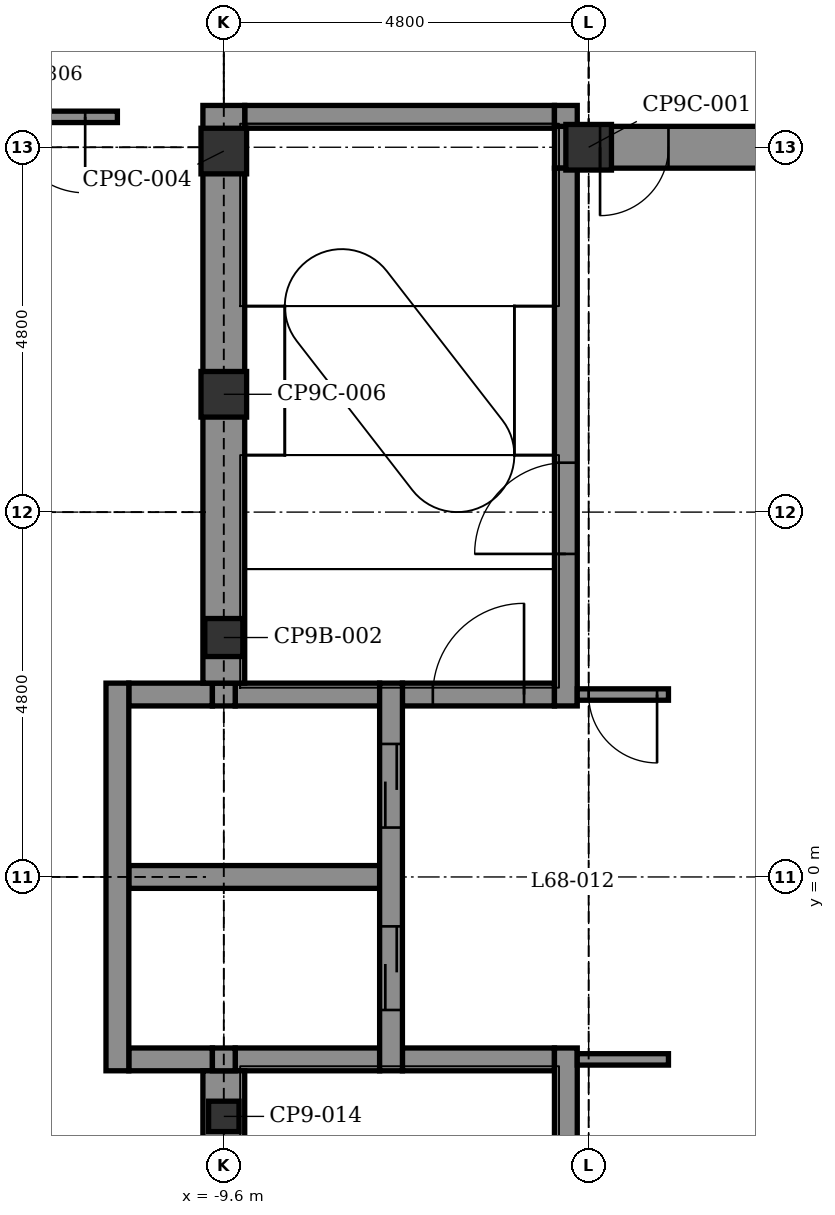
"""IFC4 building model, lengths in metres.
Left out: names, types, materials, properties, quantities, classifications, styles, units other than length and angle.
Written with IfcOpenShell. Run it as: python <this file> out.ifc"""

import sys

from ifc_helpers import new_model, si_unit, direction, frame, frame_2d, origin, origin_2d, place, context, subcontext, project, spatial, polyline, rectangle, hollow_rectangle, outline, extrude, element, fill, save


model = new_model("IFC4")
c1 = context("Model", 3, precision=1e-05, world=origin(), true_north=direction((0.0, 1.0)))
c2 = subcontext(c1, "Body", "Model", "MODEL_VIEW")
j1 = project(units=[si_unit("LENGTHUNIT", "METRE"), si_unit("PLANEANGLEUNIT", "RADIAN")], contexts=[c1])
p1 = place(None, origin())
s1 = spatial("IfcSite", under=j1, at=p1, CompositionType="ELEMENT")
p2 = place(p1, origin())
s2 = spatial("IfcBuilding", under=s1, at=p2, CompositionType="ELEMENT")
p3 = place(p2, frame((0.0, 0.0, 301.9)))
s3 = spatial("IfcBuildingStorey", under=s2, at=p3, CompositionType="ELEMENT", Elevation=301.9)
p4 = place(p3, frame((-10.85, -2.4, -0.3), z_axis=(0.0, 0.0, 1.0), x_axis=(1.0, 0.0, 0.0)))
e1 = element("IfcWall", 1, at=p4, inside=s3, PredefinedType="STANDARD", context=c2, shape_type="SweptSolid", body=[
    extrude(rectangle(XDim=1.1, YDim=0.3, at=frame_2d((0.55, 0.0))), origin(), (0.0, 0.0, 1.0), 4.7),
])
p5 = place(p3, frame((-9.45, -2.4, -0.3), z_axis=(0.0, 0.0, 1.0), x_axis=(1.0, 0.0, 0.0)))
e2 = element("IfcWall", 2, at=p5, inside=s3, PredefinedType="STANDARD", context=c2, shape_type="SweptSolid", body=[
    extrude(rectangle(XDim=1.9, YDim=0.3, at=frame_2d((0.95, 0.0))), origin(), (0.0, 0.0, 1.0), 5.3),
])
p6 = place(p3, frame((-7.25, -2.4, -0.3), z_axis=(0.0, 0.0, 1.0), x_axis=(1.0, 0.0, 0.0)))
e3 = element("IfcWall", 3, at=p6, inside=s3, PredefinedType="STANDARD", context=c2, shape_type="SweptSolid", body=[
    extrude(rectangle(XDim=2.0, YDim=0.3, at=frame_2d((1.0, 0.0))), origin(), (0.0, 0.0, 1.0), 5.3),
])
p7 = place(p3, frame((-10.85, 0.0, -0.3), z_axis=(0.0, 0.0, 1.0), x_axis=(1.0, 0.0, 0.0)))
e4 = element("IfcWall", 4, at=p7, inside=s3, PredefinedType="STANDARD", context=c2, shape_type="SweptSolid", body=[
    extrude(rectangle(XDim=3.3, YDim=0.3, at=frame_2d((1.65, 0.0))), origin(), (0.0, 0.0, 1.0), 4.7),
])
p8 = place(p3, frame((-10.85, 2.4, -0.3), z_axis=(0.0, 0.0, 1.0), x_axis=(1.0, 0.0, 0.0)))
e5 = element("IfcWall", 5, at=p8, inside=s3, PredefinedType="STANDARD", context=c2, shape_type="SweptSolid", body=[
    extrude(rectangle(XDim=1.1, YDim=0.3, at=frame_2d((0.55, 0.0))), origin(), (0.0, 0.0, 1.0), 4.7),
])
p9 = place(p3, frame((-9.45, 2.4, -0.3), z_axis=(0.0, 0.0, 1.0), x_axis=(1.0, 0.0, 0.0)))
e6 = element("IfcWall", 6, at=p9, inside=s3, PredefinedType="STANDARD", context=c2, shape_type="SweptSolid", body=[
    extrude(rectangle(XDim=1.9, YDim=0.3, at=frame_2d((0.95, 0.0))), origin(), (0.0, 0.0, 1.0), 5.3),
])
p10 = place(p3, frame((-7.25, 2.4, -0.3), z_axis=(0.0, 0.0, 1.0), x_axis=(1.0, 0.0, 0.0)))
e7 = element("IfcWall", 7, at=p10, inside=s3, PredefinedType="STANDARD", context=c2, shape_type="SweptSolid", body=[
    extrude(rectangle(XDim=2.0, YDim=0.3, at=frame_2d((1.0, 0.0))), origin(), (0.0, 0.0, 1.0), 5.3),
])
p11 = place(p10, frame((0.4, 0.0, 0.3)))
e8 = element("IfcOpeningElement", 8, at=p11, cuts=e7, PredefinedType="OPENING", context=c2, shape_type="SweptSolid", body=[
    extrude(rectangle(XDim=1.2, YDim=2.1, at=frame_2d((0.6, 1.05))), frame((0.0, 0.16, 0.0), z_axis=(0.0, -1.0, 0.0), x_axis=(1.0, 0.0, 0.0)), (0.0, 0.0, 1.0), 0.32),
])
p12 = place(p3, frame((-5.25, 9.6, -0.3), z_axis=(0.0, 0.0, 1.0), x_axis=(1.0, 0.0, 0.0)))
e9 = element("IfcWall", 9, at=p12, inside=s3, PredefinedType="SHEAR", context=c2, shape_type="SweptSolid", body=[
    extrude(rectangle(XDim=14.575, YDim=0.55, at=frame_2d((7.288, 0.0))), origin(), (0.0, 0.0, 1.0), 5.3),
])
p13 = place(p12, frame((0.6, 0.0, 0.3)))
e10 = element("IfcOpeningElement", 10, at=p13, cuts=e9, PredefinedType="OPENING", context=c2, shape_type="SweptSolid", body=[
    extrude(rectangle(XDim=0.9, YDim=2.1, at=frame_2d((0.45, 1.05))), frame((0.0, 0.285, 0.0), z_axis=(0.0, -1.0, 0.0), x_axis=(1.0, 0.0, 0.0)), (0.0, 0.0, 1.0), 0.57),
])
p14 = place(p3, frame((-9.325, 10.0, -0.3), z_axis=(0.0, 0.0, 1.0), x_axis=(1.0, 0.0, 0.0)))
e11 = element("IfcWall", 11, at=p14, inside=s3, PredefinedType="STANDARD", context=c2, shape_type="SweptSolid", body=[
    extrude(rectangle(XDim=4.075, YDim=0.3, at=frame_2d((2.038, 0.0))), origin(), (0.0, 0.0, 1.0), 5.3),
])
p15 = place(p3, frame((-11.0, -2.55, -0.3), z_axis=(0.0, 0.0, 1.0), x_axis=(0.0, 1.0, 0.0)))
e12 = element("IfcWall", 12, at=p15, inside=s3, PredefinedType="STANDARD", context=c2, shape_type="SweptSolid", body=[
    extrude(rectangle(XDim=5.1, YDim=0.3, at=frame_2d((2.55, 0.0))), origin(), (0.0, 0.0, 1.0), 4.7),
])
p16 = place(p3, frame((-9.6, -10.15, -0.3), z_axis=(0.0, 0.0, 1.0), x_axis=(0.0, 1.0, 0.0)))
e13 = element("IfcWall", 13, at=p16, inside=s3, PredefinedType="SHEAR", context=c2, shape_type="SweptSolid", body=[
    extrude(rectangle(XDim=7.6, YDim=0.55, at=frame_2d((3.8, 0.0))), origin(), (0.0, 0.0, 1.0), 5.3),
])
for number, where, z_axis, x_axis in (
    (14, (-9.6, -2.55, -0.3), (0.0, 0.0, 1.0), (0.0, 1.0, 0.0)),
    (15, (-9.6, 2.25, -0.3), (0.0, 0.0, 1.0), (0.0, 1.0, 0.0)),
):
    element("IfcWall", number, at=place(p3, frame(where, z_axis=z_axis, x_axis=x_axis)), inside=s3, PredefinedType="STANDARD", context=c2, shape_type="SweptSolid", body=[
        extrude(rectangle(XDim=0.3, YDim=0.3, at=frame_2d((0.15, 0.0))), origin(), (0.0, 0.0, 1.0), 5.3),
    ])
p17 = place(p3, frame((-9.6, 2.55, -0.3), z_axis=(0.0, 0.0, 1.0), x_axis=(0.0, 1.0, 0.0)))
e16 = element("IfcWall", 16, at=p17, inside=s3, PredefinedType="SHEAR", context=c2, shape_type="SweptSolid", body=[
    extrude(rectangle(XDim=7.6, YDim=0.55, at=frame_2d((3.8, 0.0))), origin(), (0.0, 0.0, 1.0), 5.3),
])
p18 = place(p3, frame((-7.4, -2.55, -0.3), z_axis=(0.0, 0.0, 1.0), x_axis=(0.0, 1.0, 0.0)))
e17 = element("IfcWall", 17, at=p18, inside=s3, PredefinedType="STANDARD", context=c2, shape_type="SweptSolid", body=[
    extrude(rectangle(XDim=5.1, YDim=0.3, at=frame_2d((2.55, 0.0))), origin(), (0.0, 0.0, 1.0), 4.7),
])
p19 = place(p18, frame((0.8, 0.0, 0.3)))
e18 = element("IfcOpeningElement", 18, at=p19, cuts=e17, PredefinedType="OPENING", context=c2, shape_type="SweptSolid", body=[
    extrude(rectangle(XDim=1.1, YDim=2.1, at=frame_2d((0.55, 1.05))), frame((0.0, 0.16, 0.0), z_axis=(0.0, -1.0, 0.0), x_axis=(1.0, 0.0, 0.0)), (0.0, 0.0, 1.0), 0.32),
])
p20 = place(p18, frame((3.2, 0.0, 0.3)))
e19 = element("IfcOpeningElement", 19, at=p20, cuts=e17, PredefinedType="OPENING", context=c2, shape_type="SweptSolid", body=[
    extrude(rectangle(XDim=1.1, YDim=2.1, at=frame_2d((0.55, 1.05))), frame((0.0, 0.16, 0.0), z_axis=(0.0, -1.0, 0.0), x_axis=(1.0, 0.0, 0.0)), (0.0, 0.0, 1.0), 0.32),
])
p21 = place(p3, frame((-5.1, -9.325, -0.3), z_axis=(0.0, 0.0, 1.0), x_axis=(0.0, 1.0, 0.0)))
e20 = element("IfcWall", 20, at=p21, inside=s3, PredefinedType="STANDARD", context=c2, shape_type="SweptSolid", body=[
    extrude(rectangle(XDim=7.075, YDim=0.3, at=frame_2d((3.538, 0.0))), origin(), (0.0, 0.0, 1.0), 5.3),
])
p22 = place(p21, frame((3.875, 0.0, 0.3)))
e21 = element("IfcOpeningElement", 21, at=p22, cuts=e20, PredefinedType="OPENING", context=c2, shape_type="SweptSolid", body=[
    extrude(rectangle(XDim=1.2, YDim=2.1, at=frame_2d((0.6, 1.05))), frame((0.0, 0.16, 0.0), z_axis=(0.0, -1.0, 0.0), x_axis=(1.0, 0.0, 0.0)), (0.0, 0.0, 1.0), 0.32),
])
p23 = place(p3, frame((-5.1, 2.25, -0.3), z_axis=(0.0, 0.0, 1.0), x_axis=(0.0, 1.0, 0.0)))
e22 = element("IfcWall", 22, at=p23, inside=s3, PredefinedType="STANDARD", context=c2, shape_type="SweptSolid", body=[
    extrude(rectangle(XDim=7.075, YDim=0.3, at=frame_2d((3.538, 0.0))), origin(), (0.0, 0.0, 1.0), 5.3),
])
p24 = place(p23, frame((2.0, 0.0, 0.3)))
e23 = element("IfcOpeningElement", 23, at=p24, cuts=e22, PredefinedType="OPENING", context=c2, shape_type="SweptSolid", body=[
    extrude(rectangle(XDim=1.2, YDim=2.1, at=frame_2d((0.6, 1.05))), frame((0.0, 0.16, 0.0), z_axis=(0.0, -1.0, 0.0), x_axis=(1.0, 0.0, 0.0)), (0.0, 0.0, 1.0), 0.32),
])
p25 = place(p3, frame((-5.1, 9.875, -0.3), z_axis=(0.0, 0.0, 1.0), x_axis=(0.0, 1.0, 0.0)))
e24 = element("IfcWall", 24, at=p25, inside=s3, PredefinedType="STANDARD", context=c2, shape_type="SweptSolid", body=[
    extrude(rectangle(XDim=0.275, YDim=0.3, at=frame_2d((0.137, 0.0))), origin(), (0.0, 0.0, 1.0), 5.3),
])
p26 = place(p3, frame((-9.6, -3.15, 5.0), z_axis=(0.0, 0.0, 1.0), x_axis=(1.0, 0.0, 0.0)))
e25 = element("IfcColumn", 25, at=p26, inside=s3, PredefinedType="COLUMN", context=c2, shape_type="SweptSolid", body=[
    extrude(hollow_rectangle(XDim=0.4, YDim=0.4, WallThickness=0.02, at=origin_2d()), origin(), (0.0, 0.0, 1.0), 7.773),
])
p27 = place(p3, frame((-9.6, 3.15, 5.0), z_axis=(0.0, 0.0, 1.0), x_axis=(1.0, 0.0, 0.0)))
e26 = element("IfcColumn", 26, at=p27, inside=s3, PredefinedType="COLUMN", context=c2, shape_type="SweptSolid", body=[
    extrude(hollow_rectangle(XDim=0.5, YDim=0.5, WallThickness=0.025, at=origin_2d()), origin(), (0.0, 0.0, 1.0), 11.71),
])
p28 = place(p3, frame((-9.6, 6.35, 5.0), z_axis=(0.0, 0.0, 1.0), x_axis=(1.0, 0.0, 0.0)))
e27 = element("IfcColumn", 27, at=p28, inside=s3, PredefinedType="COLUMN", context=c2, shape_type="SweptSolid", body=[
    extrude(hollow_rectangle(XDim=0.6, YDim=0.6, WallThickness=0.032, at=origin_2d()), origin(), (0.0, 0.0, 1.0), 13.71),
])
p29 = place(p3, frame((-9.6, 9.55, 5.0), z_axis=(0.0, 0.0, 1.0), x_axis=(1.0, 0.0, 0.0)))
e28 = element("IfcColumn", 28, at=p29, inside=s3, PredefinedType="COLUMN", context=c2, shape_type="SweptSolid", body=[
    extrude(hollow_rectangle(XDim=0.6, YDim=0.6, WallThickness=0.032, at=origin_2d()), origin(), (0.0, 0.0, 1.0), 15.709),
])
p30 = place(p3, frame((-4.8, 9.6, 5.0), z_axis=(0.0, 0.0, 1.0), x_axis=(1.0, 0.0, 0.0)))
e29 = element("IfcColumn", 29, at=p30, inside=s3, PredefinedType="COLUMN", context=c2, shape_type="SweptSolid", body=[
    extrude(hollow_rectangle(XDim=0.6, YDim=0.6, WallThickness=0.032, at=origin_2d()), origin(), (0.0, 0.0, 1.0), 14.915),
])
p31 = place(p3, frame((-10.358, -15.065, 0.0), z_axis=(0.0, 0.0, 1.0), x_axis=(-0.500010301671, 0.86601945603, 0.0)))
e30 = element("IfcWall", 30, at=p31, inside=s3, PredefinedType="SOLIDWALL", context=c2, shape_type="SweptSolid", body=[
    extrude(outline(polyline([(0.0, 0.0), (15.736, 0.0), (15.736, 14.197), (0.0, 5.682), (0.0, 0.0)])), frame((0.0, 0.125, 0.0), z_axis=(0.0, -1.0, 0.0), x_axis=(1.0, 0.0, 0.0)), (0.0, 0.0, 1.0), 0.25),
])
p32 = place(p31, frame((9.068, 0.0, 5.8)))
e31 = element("IfcOpeningElement", 31, at=p32, cuts=e30, PredefinedType="OPENING", context=c2, shape_type="SweptSolid", body=[
    extrude(rectangle(XDim=2.4, YDim=3.6, at=frame_2d((1.2, 1.8))), frame((0.0, 0.135, 0.0), z_axis=(0.0, -1.0, 0.0), x_axis=(1.0, 0.0, 0.0)), (0.0, 0.0, 1.0), 0.27),
])
p33 = place(p31, frame((9.068, 0.0, 1.0)))
e32 = element("IfcOpeningElement", 32, at=p33, cuts=e30, PredefinedType="OPENING", context=c2, shape_type="SweptSolid", body=[
    extrude(rectangle(XDim=2.4, YDim=3.0, at=frame_2d((1.2, 1.5))), frame((0.0, 0.135, 0.0), z_axis=(0.0, -1.0, 0.0), x_axis=(1.0, 0.0, 0.0)), (0.0, 0.0, 1.0), 0.27),
])
p34 = place(p3, frame((-18.226, 1.438, 0.0), z_axis=(0.0, 0.0, 1.0), x_axis=(0.500010301671, 0.86601945603, 0.0)))
e33 = element("IfcWall", 33, at=p34, inside=s3, PredefinedType="SOLIDWALL", context=c2, shape_type="SweptSolid", body=[
    extrude(outline(polyline([(0.0, 0.0), (15.736, 0.0), (15.736, 24.509), (0.0, 15.994), (0.0, 0.0)])), frame((0.0, 0.125, 0.0), z_axis=(0.0, -1.0, 0.0), x_axis=(1.0, 0.0, 0.0)), (0.0, 0.0, 1.0), 0.25),
])
p35 = place(p34, frame((4.268, 0.0, 5.8)))
e34 = element("IfcOpeningElement", 34, at=p35, cuts=e33, PredefinedType="OPENING", context=c2, shape_type="SweptSolid", body=[
    extrude(rectangle(XDim=2.4, YDim=3.6, at=frame_2d((1.2, 1.8))), frame((0.0, 0.135, 0.0), z_axis=(0.0, -1.0, 0.0), x_axis=(1.0, 0.0, 0.0)), (0.0, 0.0, 1.0), 0.27),
])
p36 = place(p34, frame((4.268, 0.0, 10.0)))
e35 = element("IfcOpeningElement", 35, at=p36, cuts=e33, PredefinedType="OPENING", context=c2, shape_type="SweptSolid", body=[
    extrude(rectangle(XDim=2.4, YDim=3.6, at=frame_2d((1.2, 1.8))), frame((0.0, 0.135, 0.0), z_axis=(0.0, -1.0, 0.0), x_axis=(1.0, 0.0, 0.0)), (0.0, 0.0, 1.0), 0.27),
])
p37 = place(p34, frame((9.068, 0.0, 5.8)))
e36 = element("IfcOpeningElement", 36, at=p37, cuts=e33, PredefinedType="OPENING", context=c2, shape_type="SweptSolid", body=[
    extrude(rectangle(XDim=2.4, YDim=3.6, at=frame_2d((1.2, 1.8))), frame((0.0, 0.135, 0.0), z_axis=(0.0, -1.0, 0.0), x_axis=(1.0, 0.0, 0.0)), (0.0, 0.0, 1.0), 0.27),
])
p38 = place(p34, frame((9.068, 0.0, 10.0)))
e37 = element("IfcOpeningElement", 37, at=p38, cuts=e33, PredefinedType="OPENING", context=c2, shape_type="SweptSolid", body=[
    extrude(rectangle(XDim=2.4, YDim=3.6, at=frame_2d((1.2, 1.8))), frame((0.0, 0.135, 0.0), z_axis=(0.0, -1.0, 0.0), x_axis=(1.0, 0.0, 0.0)), (0.0, 0.0, 1.0), 0.27),
])
p39 = place(p34, frame((9.068, 0.0, 14.2)))
e38 = element("IfcOpeningElement", 38, at=p39, cuts=e33, PredefinedType="OPENING", context=c2, shape_type="SweptSolid", body=[
    extrude(rectangle(XDim=2.4, YDim=3.6, at=frame_2d((1.2, 1.8))), frame((0.0, 0.135, 0.0), z_axis=(0.0, -1.0, 0.0), x_axis=(1.0, 0.0, 0.0)), (0.0, 0.0, 1.0), 0.27),
])
p40 = place(p34, frame((4.268, 0.0, 1.0)))
e39 = element("IfcOpeningElement", 39, at=p40, cuts=e33, PredefinedType="OPENING", context=c2, shape_type="SweptSolid", body=[
    extrude(rectangle(XDim=2.4, YDim=3.0, at=frame_2d((1.2, 1.5))), frame((0.0, 0.135, 0.0), z_axis=(0.0, -1.0, 0.0), x_axis=(1.0, 0.0, 0.0)), (0.0, 0.0, 1.0), 0.27),
])
p41 = place(p3, frame((-13.288, 10.0, 0.0), z_axis=(0.0, 0.0, 1.0), x_axis=(1.0, 0.0, 0.0)))
e40 = element("IfcWall", 40, at=p41, inside=s3, PredefinedType="PARTITIONING", context=c2, shape_type="SweptSolid", body=[
    extrude(rectangle(XDim=2.288, YDim=0.15, at=frame_2d((1.144, 0.0))), origin(), (0.0, 0.0, 1.0), 5.0),
])
p42 = place(p41, frame((0.864, 0.0, 0.0)))
e41 = element("IfcOpeningElement", 41, at=p42, cuts=e40, PredefinedType="OPENING", context=c2, shape_type="SweptSolid", body=[
    extrude(rectangle(XDim=1.0, YDim=2.1, at=frame_2d((0.5, 1.05))), frame((0.0, 0.085, 0.0), z_axis=(0.0, -1.0, 0.0), x_axis=(1.0, 0.0, 0.0)), (0.0, 0.0, 1.0), 0.17),
])
p43 = place(p3, frame((-4.95, 2.4, 0.0), z_axis=(0.0, 0.0, 1.0), x_axis=(1.0, 0.0, 0.0)))
e42 = element("IfcWall", 42, at=p43, inside=s3, PredefinedType="PARTITIONING", context=c2, shape_type="SweptSolid", body=[
    extrude(rectangle(XDim=1.2, YDim=0.15, at=frame_2d((0.6, 0.0))), origin(), (0.0, 0.0, 1.0), 5.0),
])
p44 = place(p43, frame((0.15, 0.0, 0.0)))
e43 = element("IfcOpeningElement", 43, at=p44, cuts=e42, PredefinedType="OPENING", context=c2, shape_type="SweptSolid", body=[
    extrude(rectangle(XDim=0.9, YDim=2.1, at=frame_2d((0.45, 1.05))), frame((0.0, 0.085, 0.0), z_axis=(0.0, -1.0, 0.0), x_axis=(1.0, 0.0, 0.0)), (0.0, 0.0, 1.0), 0.17),
])
p45 = place(p3, frame((-4.95, -2.4, 0.0), z_axis=(0.0, 0.0, 1.0), x_axis=(1.0, 0.0, 0.0)))
e44 = element("IfcWall", 44, at=p45, inside=s3, PredefinedType="PARTITIONING", context=c2, shape_type="SweptSolid", body=[
    extrude(rectangle(XDim=1.2, YDim=0.15, at=frame_2d((0.6, 0.0))), origin(), (0.0, 0.0, 1.0), 5.0),
])
p46 = place(p42, frame((1.0, 0.0, 0.0), z_axis=(0.0, 0.0, 1.0), x_axis=(-1.0, 0.0, 0.0)))
e45 = element("IfcDoor", 45, at=p46, inside=s3, OperationType="SINGLE_SWING_RIGHT", PredefinedType="DOOR", context=c2, shape_type="SweptSolid", body=[
    extrude(rectangle(XDim=1.0, YDim=2.1, at=frame_2d((0.5, 1.05))), frame((0.0, 0.025, 0.0), z_axis=(0.0, -1.0, 0.0), x_axis=(1.0, 0.0, 0.0)), (0.0, 0.0, 1.0), 0.05),
])
fill(e41, e45)
p47 = place(p19, origin())
e46 = element("IfcDoor", 46, at=p47, inside=s3, OperationType="DOUBLE_DOOR_SLIDING", PredefinedType="DOOR", context=c2, shape_type="SweptSolid", body=[
    extrude(rectangle(XDim=1.1, YDim=2.1, at=frame_2d((0.55, 1.05))), frame((0.0, 0.025, 0.0), z_axis=(0.0, -1.0, 0.0), x_axis=(1.0, 0.0, 0.0)), (0.0, 0.0, 1.0), 0.05),
])
fill(e18, e46)
p48 = place(p20, origin())
e47 = element("IfcDoor", 47, at=p48, inside=s3, OperationType="DOUBLE_DOOR_SLIDING", PredefinedType="DOOR", context=c2, shape_type="SweptSolid", body=[
    extrude(rectangle(XDim=1.1, YDim=2.1, at=frame_2d((0.55, 1.05))), frame((0.0, 0.025, 0.0), z_axis=(0.0, -1.0, 0.0), x_axis=(1.0, 0.0, 0.0)), (0.0, 0.0, 1.0), 0.05),
])
fill(e19, e47)
p49 = place(p24, origin())
e48 = element("IfcDoor", 48, at=p49, inside=s3, OperationType="SINGLE_SWING_LEFT", PredefinedType="DOOR", context=c2, shape_type="SweptSolid", body=[
    extrude(rectangle(XDim=1.2, YDim=2.1, at=frame_2d((0.6, 1.05))), frame((0.0, 0.025, 0.0), z_axis=(0.0, -1.0, 0.0), x_axis=(1.0, 0.0, 0.0)), (0.0, 0.0, 1.0), 0.05),
])
fill(e23, e48)
p50 = place(p13, frame((0.9, 0.0, 0.0), z_axis=(0.0, 0.0, 1.0), x_axis=(-1.0, 0.0, 0.0)))
e49 = element("IfcDoor", 49, at=p50, inside=s3, OperationType="SINGLE_SWING_LEFT", PredefinedType="DOOR", context=c2, shape_type="SweptSolid", body=[
    extrude(rectangle(XDim=0.9, YDim=2.1, at=frame_2d((0.45, 1.05))), frame((0.0, 0.025, 0.0), z_axis=(0.0, -1.0, 0.0), x_axis=(1.0, 0.0, 0.0)), (0.0, 0.0, 1.0), 0.05),
])
fill(e10, e49)
p51 = place(p44, frame((0.9, 0.0, 0.0), z_axis=(0.0, 0.0, 1.0), x_axis=(-1.0, 0.0, 0.0)))
e50 = element("IfcDoor", 50, at=p51, inside=s3, OperationType="SINGLE_SWING_RIGHT", PredefinedType="DOOR", context=c2, shape_type="SweptSolid", body=[
    extrude(rectangle(XDim=0.9, YDim=2.1, at=frame_2d((0.45, 1.05))), frame((0.0, 0.025, 0.0), z_axis=(0.0, -1.0, 0.0), x_axis=(1.0, 0.0, 0.0)), (0.0, 0.0, 1.0), 0.05),
])
fill(e43, e50)
p52 = place(p11, origin())
e51 = element("IfcDoor", 51, at=p52, inside=s3, OperationType="SINGLE_SWING_RIGHT", PredefinedType="DOOR", context=c2, shape_type="SweptSolid", body=[
    extrude(rectangle(XDim=1.2, YDim=2.1, at=frame_2d((0.6, 1.05))), frame((0.0, 0.025, 0.0), z_axis=(0.0, -1.0, 0.0), x_axis=(1.0, 0.0, 0.0)), (0.0, 0.0, 1.0), 0.05),
])
fill(e8, e51)
save(model, sys.argv[1])
